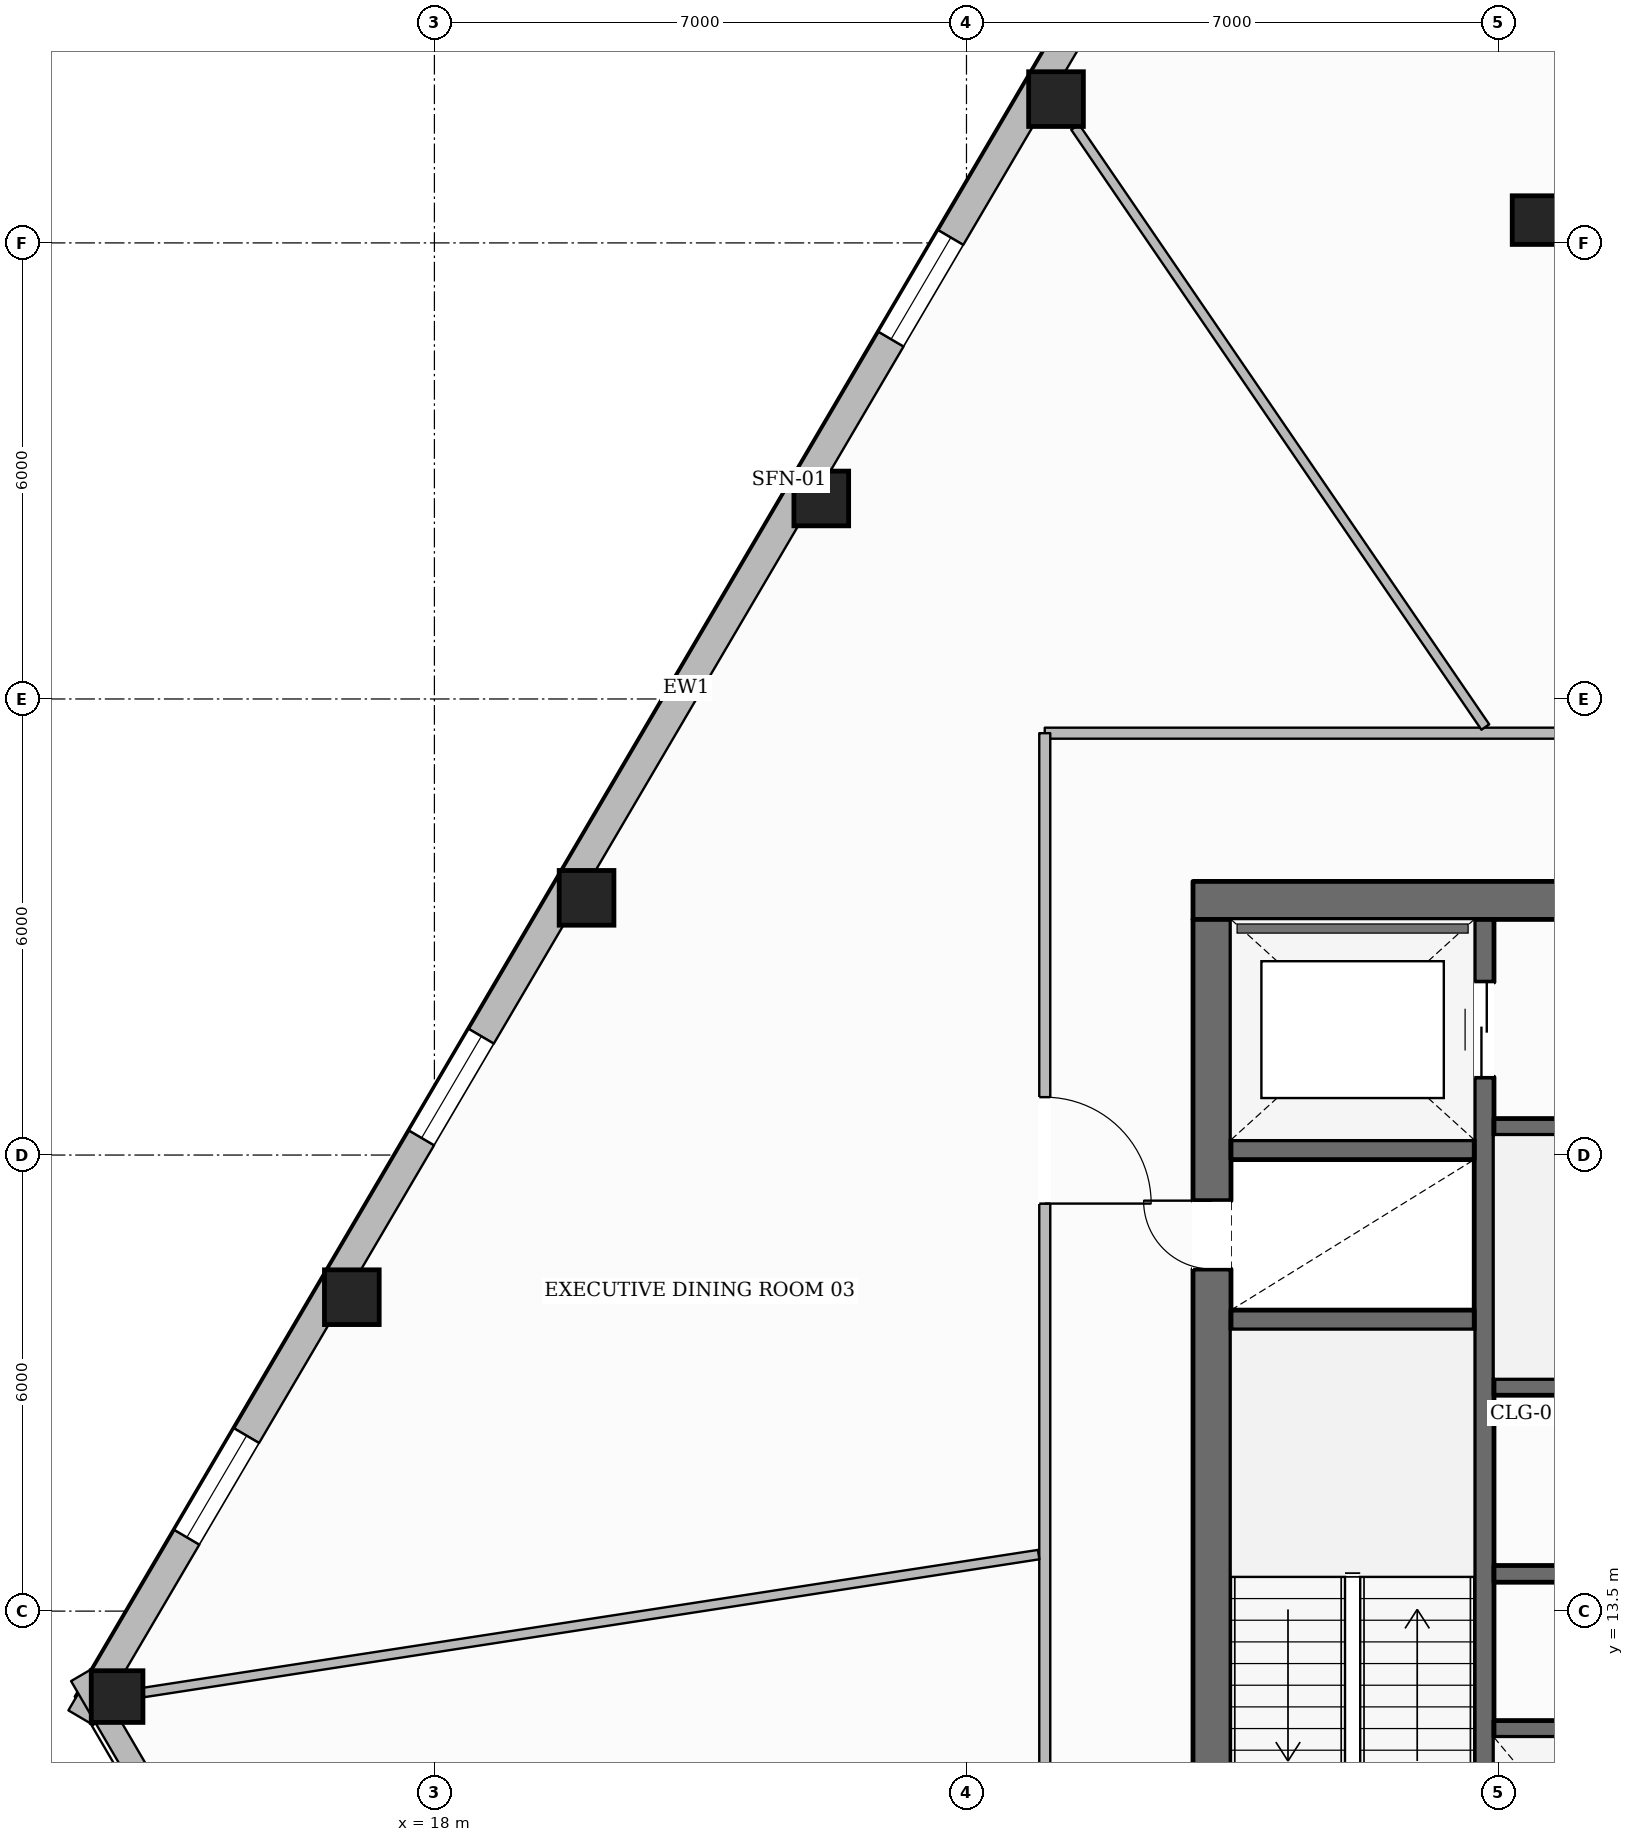
"""IFC4 building model, lengths in metres.
Left out: names, types, materials, properties, quantities, classifications, styles, units other than length and angle.
Written with IfcOpenShell. Run it as: python <this file> out.ifc"""

import sys

from ifc_helpers import new_model, si_unit, direction, frame, frame_2d, origin, origin_2d, place, context, subcontext, project, spatial, rectangle, hollow_rectangle, extrude, element, fill, save


model = new_model("IFC4")
c1 = context("Model", 3, precision=1e-05, world=origin(), true_north=direction((0.0, 1.0)))
c2 = subcontext(c1, "Body", "Model", "MODEL_VIEW")
j1 = project(units=[si_unit("LENGTHUNIT", "METRE"), si_unit("PLANEANGLEUNIT", "RADIAN")], contexts=[c1])
p1 = place(None, origin())
s1 = spatial("IfcSite", under=j1, at=p1, CompositionType="ELEMENT")
p2 = place(p1, origin())
s2 = spatial("IfcBuilding", under=s1, at=p2, CompositionType="ELEMENT")
p3 = place(p2, frame((0.0, 0.0, 135.55)))
s3 = spatial("IfcBuildingStorey", under=s2, at=p3, CompositionType="ELEMENT", Elevation=135.55)
p4 = place(p3, frame((27.98, 22.85, 0.0), z_axis=(0.0, 0.0, 1.0), x_axis=(1.0, 0.0, 0.0)))
e1 = element("IfcWall", 1, at=p4, inside=s3, PredefinedType="SOLIDWALL", context=c2, shape_type="SweptSolid", body=[
    extrude(rectangle(XDim=20.04, YDim=0.5, at=frame_2d((10.02, 0.0))), origin(), (0.0, 0.0, 1.0), 3.6),
])
p5 = place(p4, frame((6.295, 0.0, 0.0)))
e2 = element("IfcOpeningElement", 2, at=p5, cuts=e1, PredefinedType="OPENING", context=c2, shape_type="SweptSolid", body=[
    extrude(rectangle(XDim=1.05, YDim=2.15, at=frame_2d((0.525, 1.075))), frame((0.0, 0.26, 0.0), z_axis=(0.0, -1.0, 0.0), x_axis=(1.0, 0.0, 0.0)), (0.0, 0.0, 1.0), 0.52),
])
p6 = place(p4, frame((12.695, 0.0, 0.0)))
e3 = element("IfcOpeningElement", 3, at=p6, cuts=e1, PredefinedType="OPENING", context=c2, shape_type="SweptSolid", body=[
    extrude(rectangle(XDim=1.05, YDim=2.15, at=frame_2d((0.525, 1.075))), frame((0.0, 0.26, 0.0), z_axis=(0.0, -1.0, 0.0), x_axis=(1.0, 0.0, 0.0)), (0.0, 0.0, 1.0), 0.52),
])
p7 = place(p3, frame((28.23, 9.6, 0.0), z_axis=(0.0, 0.0, 1.0), x_axis=(0.0, 1.0, 0.0)))
e4 = element("IfcWall", 4, at=p7, inside=s3, PredefinedType="SOLIDWALL", context=c2, shape_type="SweptSolid", body=[
    extrude(rectangle(XDim=13.0, YDim=0.5, at=frame_2d((6.5, 0.0))), origin(), (0.0, 0.0, 1.0), 3.6),
])
p8 = place(p7, frame((0.2, 0.0, 0.0)))
e5 = element("IfcOpeningElement", 5, at=p8, cuts=e4, PredefinedType="OPENING", context=c2, shape_type="SweptSolid", body=[
    extrude(rectangle(XDim=1.1, YDim=2.15, at=frame_2d((0.55, 1.075))), frame((0.0, 0.26, 0.0), z_axis=(0.0, -1.0, 0.0), x_axis=(1.0, 0.0, 0.0)), (0.0, 0.0, 1.0), 0.52),
])
p9 = place(p7, frame((8.4, 0.0, 0.0)))
e6 = element("IfcOpeningElement", 6, at=p9, cuts=e4, PredefinedType="OPENING", context=c2, shape_type="SweptSolid", body=[
    extrude(rectangle(XDim=0.9, YDim=2.1, at=frame_2d((0.45, 1.05))), frame((0.0, 0.26, 0.0), z_axis=(0.0, -1.0, 0.0), x_axis=(1.0, 0.0, 0.0)), (0.0, 0.0, 1.0), 0.52),
])
p10 = place(p3, frame((31.81, 9.6, 0.0), z_axis=(0.0, 0.0, 1.0), x_axis=(0.0, 1.0, 0.0)))
e7 = element("IfcWall", 7, at=p10, inside=s3, PredefinedType="SHEAR", context=c2, shape_type="SweptSolid", body=[
    extrude(rectangle(XDim=13.0, YDim=0.26, at=frame_2d((6.5, 0.0))), origin(), (0.0, 0.0, 1.0), 3.6),
])
p11 = place(p10, frame((10.925, 0.0, 0.0)))
e8 = element("IfcOpeningElement", 8, at=p11, cuts=e7, PredefinedType="OPENING", context=c2, shape_type="SweptSolid", body=[
    extrude(rectangle(XDim=1.25, YDim=2.25, at=frame_2d((0.625, 1.125))), frame((0.0, 0.14, 0.0), z_axis=(0.0, -1.0, 0.0), x_axis=(1.0, 0.0, 0.0)), (0.0, 0.0, 1.0), 0.28),
])
for number, where, z_axis, x_axis in (
    (9, (28.48, 17.33, 0.0), (0.0, 0.0, 1.0), (1.0, 0.0, 0.0)),
    (10, (28.48, 19.57, 0.0), (0.0, 0.0, 1.0), (1.0, 0.0, 0.0)),
):
    element("IfcWall", number, at=place(p3, frame(where, z_axis=z_axis, x_axis=x_axis)), inside=s3, PredefinedType="SHEAR", context=c2, shape_type="SweptSolid", body=[
        extrude(rectangle(XDim=3.2, YDim=0.26, at=frame_2d((1.6, 0.0))), origin(), (0.0, 0.0, 1.0), 3.6),
    ])
p12 = place(p3, frame((31.94, 19.87, 0.0), z_axis=(0.0, 0.0, 1.0), x_axis=(1.0, 0.0, 0.0)))
e11 = element("IfcWall", 11, at=p12, inside=s3, PredefinedType="SOLIDWALL", context=c2, shape_type="SweptSolid", body=[
    extrude(rectangle(XDim=12.12, YDim=0.22, at=frame_2d((6.06, 0.0))), origin(), (0.0, 0.0, 1.0), 3.6),
])
p13 = place(p12, frame((6.3, 0.0, 0.0)))
e12 = element("IfcOpeningElement", 12, at=p13, cuts=e11, PredefinedType="OPENING", context=c2, shape_type="SweptSolid", body=[
    extrude(rectangle(XDim=1.1, YDim=2.15, at=frame_2d((0.55, 1.075))), frame((0.0, 0.12, 0.0), z_axis=(0.0, -1.0, 0.0), x_axis=(1.0, 0.0, 0.0)), (0.0, 0.0, 1.0), 0.24),
])
p14 = place(p12, frame((8.61, 0.0, 0.0)))
e13 = element("IfcOpeningElement", 13, at=p14, cuts=e11, PredefinedType="OPENING", context=c2, shape_type="SweptSolid", body=[
    extrude(rectangle(XDim=0.9, YDim=2.1, at=frame_2d((0.45, 1.05))), frame((0.0, 0.12, 0.0), z_axis=(0.0, -1.0, 0.0), x_axis=(1.0, 0.0, 0.0)), (0.0, 0.0, 1.0), 0.24),
])
p15 = place(p12, frame((10.85, 0.0, 0.0)))
e14 = element("IfcOpeningElement", 14, at=p15, cuts=e11, PredefinedType="OPENING", context=c2, shape_type="SweptSolid", body=[
    extrude(rectangle(XDim=0.9, YDim=2.1, at=frame_2d((0.45, 1.05))), frame((0.0, 0.12, 0.0), z_axis=(0.0, -1.0, 0.0), x_axis=(1.0, 0.0, 0.0)), (0.0, 0.0, 1.0), 0.24),
])
p16 = place(p3, frame((31.94, 16.45, 0.0), z_axis=(0.0, 0.0, 1.0), x_axis=(1.0, 0.0, 0.0)))
e15 = element("IfcWall", 15, at=p16, inside=s3, PredefinedType="SOLIDWALL", context=c2, shape_type="SweptSolid", body=[
    extrude(rectangle(XDim=12.12, YDim=0.22, at=frame_2d((6.06, 0.0))), origin(), (0.0, 0.0, 1.0), 3.6),
])
p17 = place(p3, frame((31.94, 13.99, 0.0), z_axis=(0.0, 0.0, 1.0), x_axis=(1.0, 0.0, 0.0)))
e16 = element("IfcWall", 16, at=p17, inside=s3, PredefinedType="SOLIDWALL", context=c2, shape_type="SweptSolid", body=[
    extrude(rectangle(XDim=12.12, YDim=0.22, at=frame_2d((6.06, 0.0))), origin(), (0.0, 0.0, 1.0), 3.6),
])
p18 = place(p17, frame((2.51, 0.0, 0.0)))
e17 = element("IfcOpeningElement", 17, at=p18, cuts=e16, PredefinedType="OPENING", context=c2, shape_type="SweptSolid", body=[
    extrude(rectangle(XDim=0.9, YDim=2.1, at=frame_2d((0.45, 1.05))), frame((0.0, 0.12, 0.0), z_axis=(0.0, -1.0, 0.0), x_axis=(1.0, 0.0, 0.0)), (0.0, 0.0, 1.0), 0.24),
])
p19 = place(p17, frame((6.535, 0.0, 0.0)))
e18 = element("IfcOpeningElement", 18, at=p19, cuts=e16, PredefinedType="OPENING", context=c2, shape_type="SweptSolid", body=[
    extrude(rectangle(XDim=1.1, YDim=2.2, at=frame_2d((0.55, 1.1))), frame((0.0, 0.12, 0.0), z_axis=(0.0, -1.0, 0.0), x_axis=(1.0, 0.0, 0.0)), (0.0, 0.0, 1.0), 0.24),
])
p20 = place(p17, frame((8.585, 0.0, 0.0)))
e19 = element("IfcOpeningElement", 19, at=p20, cuts=e16, PredefinedType="OPENING", context=c2, shape_type="SweptSolid", body=[
    extrude(rectangle(XDim=1.1, YDim=2.2, at=frame_2d((0.55, 1.1))), frame((0.0, 0.12, 0.0), z_axis=(0.0, -1.0, 0.0), x_axis=(1.0, 0.0, 0.0)), (0.0, 0.0, 1.0), 0.24),
])
p21 = place(p17, frame((10.635, 0.0, 0.0)))
e20 = element("IfcOpeningElement", 20, at=p21, cuts=e16, PredefinedType="OPENING", context=c2, shape_type="SweptSolid", body=[
    extrude(rectangle(XDim=1.1, YDim=2.2, at=frame_2d((0.55, 1.1))), frame((0.0, 0.12, 0.0), z_axis=(0.0, -1.0, 0.0), x_axis=(1.0, 0.0, 0.0)), (0.0, 0.0, 1.0), 0.24),
])
p22 = place(p3, frame((31.94, 11.95, 0.0), z_axis=(0.0, 0.0, 1.0), x_axis=(1.0, 0.0, 0.0)))
e21 = element("IfcWall", 21, at=p22, inside=s3, PredefinedType="SOLIDWALL", context=c2, shape_type="SweptSolid", body=[
    extrude(rectangle(XDim=6.19, YDim=0.22, at=frame_2d((3.095, 0.0))), origin(), (0.0, 0.0, 1.0), 3.6),
])
for number, where, z_axis, x_axis in (
    (22, (26.178, 33.392, 0.0), (0.0, 0.0, 1.0), (1.0, 0.0, 0.0)),
    (23, (23.09, 28.138, 0.0), (0.0, 0.0, 1.0), (1.0, 0.0, 0.0)),
    (24, (20.002, 22.884, 0.0), (0.0, 0.0, 1.0), (1.0, 0.0, 0.0)),
    (25, (16.914, 17.63, 0.0), (0.0, 0.0, 1.0), (1.0, 0.0, 0.0)),
):
    element("IfcColumn", number, at=place(p3, frame(where, z_axis=z_axis, x_axis=x_axis)), inside=s3, PredefinedType="COLUMN", context=c2, shape_type="SweptSolid", body=[
        extrude(hollow_rectangle(XDim=0.72, YDim=0.72, WallThickness=0.032, at=origin_2d()), origin(), (0.0, 0.0, 1.0), 3.6),
    ])
p23 = place(p3, frame((13.825, 12.376, 0.0), z_axis=(0.0, 0.0, 1.0), x_axis=(1.0, 0.0, 0.0)))
e26 = element("IfcColumn", 26, at=p23, inside=s3, PredefinedType="COLUMN", context=c2, shape_type="SweptSolid", body=[
    extrude(hollow_rectangle(XDim=0.68, YDim=0.68, WallThickness=0.03, at=origin_2d()), origin(), (0.0, 0.0, 1.0), 3.6),
])
p24 = place(p3, frame((32.5, 31.8, 0.0), z_axis=(0.0, 0.0, 1.0), x_axis=(1.0, 0.0, 0.0)))
e27 = element("IfcColumn", 27, at=p24, inside=s3, PredefinedType="COLUMN", context=c2, shape_type="SweptSolid", body=[
    extrude(hollow_rectangle(XDim=0.64, YDim=0.64, WallThickness=0.028, at=origin_2d()), origin(), (0.0, 0.0, 1.0), 3.6),
])
p25 = place(p3, frame((13.349, 12.098, 0.0), z_axis=(0.0, 0.0, 1.0), x_axis=(0.506726076083, 0.862107118528, 0.0)))
e28 = element("IfcWall", 28, at=p25, inside=s3, PredefinedType="STANDARD", context=c2, shape_type="SweptSolid", body=[
    extrude(rectangle(XDim=37.522, YDim=0.38, at=frame_2d((18.761, 0.0))), origin(), (0.0, 0.0, 1.0), 3.059),
])
p26 = place(p25, frame((33.226, 0.0, 0.65)))
e29 = element("IfcOpeningElement", 29, at=p26, cuts=e28, PredefinedType="OPENING", context=c2, shape_type="SweptSolid", body=[
    extrude(rectangle(XDim=1.55, YDim=1.75, at=frame_2d((0.775, 0.875))), frame((0.0, 0.2, 0.0), z_axis=(0.0, -1.0, 0.0), x_axis=(1.0, 0.0, 0.0)), (0.0, 0.0, 1.0), 0.4),
])
p27 = place(p25, frame((27.131, 0.0, 0.65)))
e30 = element("IfcOpeningElement", 30, at=p27, cuts=e28, PredefinedType="OPENING", context=c2, shape_type="SweptSolid", body=[
    extrude(rectangle(XDim=1.55, YDim=1.75, at=frame_2d((0.775, 0.875))), frame((0.0, 0.2, 0.0), z_axis=(0.0, -1.0, 0.0), x_axis=(1.0, 0.0, 0.0)), (0.0, 0.0, 1.0), 0.4),
])
p28 = place(p25, frame((21.037, 0.0, 0.65)))
e31 = element("IfcOpeningElement", 31, at=p28, cuts=e28, PredefinedType="OPENING", context=c2, shape_type="SweptSolid", body=[
    extrude(rectangle(XDim=1.55, YDim=1.75, at=frame_2d((0.775, 0.875))), frame((0.0, 0.2, 0.0), z_axis=(0.0, -1.0, 0.0), x_axis=(1.0, 0.0, 0.0)), (0.0, 0.0, 1.0), 0.4),
])
p29 = place(p25, frame((8.848, 0.0, 0.65)))
e32 = element("IfcOpeningElement", 32, at=p29, cuts=e28, PredefinedType="OPENING", context=c2, shape_type="SweptSolid", body=[
    extrude(rectangle(XDim=1.55, YDim=1.75, at=frame_2d((0.775, 0.875))), frame((0.0, 0.2, 0.0), z_axis=(0.0, -1.0, 0.0), x_axis=(1.0, 0.0, 0.0)), (0.0, 0.0, 1.0), 0.4),
])
p30 = place(p25, frame((2.753, 0.0, 0.65)))
e33 = element("IfcOpeningElement", 33, at=p30, cuts=e28, PredefinedType="OPENING", context=c2, shape_type="SweptSolid", body=[
    extrude(rectangle(XDim=1.55, YDim=1.75, at=frame_2d((0.775, 0.875))), frame((0.0, 0.2, 0.0), z_axis=(0.0, -1.0, 0.0), x_axis=(1.0, 0.0, 0.0)), (0.0, 0.0, 1.0), 0.4),
])
p31 = place(p3, frame((19.411, 2.271, 0.0), z_axis=(0.0, 0.0, 1.0), x_axis=(-0.504147492574, 0.863617569142, 0.0)))
e34 = element("IfcWall", 34, at=p31, inside=s3, PredefinedType="STANDARD", context=c2, shape_type="SweptSolid", body=[
    extrude(rectangle(XDim=12.023, YDim=0.3, at=frame_2d((6.012, 0.0))), origin(), (0.0, 0.0, 1.0), 3.059),
])
p32 = place(p31, frame((5.412, 0.0, 0.65)))
e35 = element("IfcOpeningElement", 35, at=p32, cuts=e34, PredefinedType="OPENING", context=c2, shape_type="SweptSolid", body=[
    extrude(rectangle(XDim=1.2, YDim=1.7, at=frame_2d((0.6, 0.85))), frame((0.0, 0.16, 0.0), z_axis=(0.0, -1.0, 0.0), x_axis=(1.0, 0.0, 0.0)), (0.0, 0.0, 1.0), 0.32),
])
p33 = place(p3, frame((49.97, 25.05, 0.0), z_axis=(0.0, 0.0, 1.0), x_axis=(-1.0, 0.0, 0.0)))
e36 = element("IfcWall", 36, at=p33, inside=s3, PredefinedType="PARTITIONING", context=c2, shape_type="SweptSolid", body=[
    extrude(rectangle(XDim=23.94, YDim=0.145, at=frame_2d((11.97, 0.0))), origin(), (0.0, 0.0, 1.0), 3.6),
])
p34 = place(p33, frame((14.53, 0.0, 0.0)))
e37 = element("IfcOpeningElement", 37, at=p34, cuts=e36, PredefinedType="OPENING", context=c2, shape_type="SweptSolid", body=[
    extrude(rectangle(XDim=0.88, YDim=2.1, at=frame_2d((0.44, 1.05))), frame((0.0, 0.083, 0.0), z_axis=(0.0, -1.0, 0.0), x_axis=(1.0, 0.0, 0.0)), (0.0, 0.0, 1.0), 0.165),
])
p35 = place(p33, frame((12.01, 0.0, 0.0)))
e38 = element("IfcOpeningElement", 38, at=p35, cuts=e36, PredefinedType="OPENING", context=c2, shape_type="SweptSolid", body=[
    extrude(rectangle(XDim=0.88, YDim=2.1, at=frame_2d((0.44, 1.05))), frame((0.0, 0.083, 0.0), z_axis=(0.0, -1.0, 0.0), x_axis=(1.0, 0.0, 0.0)), (0.0, 0.0, 1.0), 0.165),
])
p36 = place(p33, frame((9.55, 0.0, 0.0)))
e39 = element("IfcOpeningElement", 39, at=p36, cuts=e36, PredefinedType="OPENING", context=c2, shape_type="SweptSolid", body=[
    extrude(rectangle(XDim=0.96, YDim=2.1, at=frame_2d((0.48, 1.05))), frame((0.0, 0.083, 0.0), z_axis=(0.0, -1.0, 0.0), x_axis=(1.0, 0.0, 0.0)), (0.0, 0.0, 1.0), 0.165),
])
p37 = place(p33, frame((6.709, 0.0, 0.0)))
e40 = element("IfcOpeningElement", 40, at=p37, cuts=e36, PredefinedType="OPENING", context=c2, shape_type="SweptSolid", body=[
    extrude(rectangle(XDim=1.4, YDim=2.2, at=frame_2d((0.7, 1.1))), frame((0.0, 0.083, 0.0), z_axis=(0.0, -1.0, 0.0), x_axis=(1.0, 0.0, 0.0)), (0.0, 0.0, 1.0), 0.165),
])
p38 = place(p3, frame((26.03, 25.05, 0.0), z_axis=(0.0, 0.0, 1.0), x_axis=(0.0, -1.0, 0.0)))
e41 = element("IfcWall", 41, at=p38, inside=s3, PredefinedType="PARTITIONING", context=c2, shape_type="SweptSolid", body=[
    extrude(rectangle(XDim=17.9, YDim=0.145, at=frame_2d((8.95, 0.0))), origin(), (0.0, 0.0, 1.0), 3.288),
])
p39 = place(p38, frame((4.789, 0.0, 0.0)))
e42 = element("IfcOpeningElement", 42, at=p39, cuts=e41, PredefinedType="OPENING", context=c2, shape_type="SweptSolid", body=[
    extrude(rectangle(XDim=1.4, YDim=2.2, at=frame_2d((0.7, 1.1))), frame((0.0, 0.083, 0.0), z_axis=(0.0, -1.0, 0.0), x_axis=(1.0, 0.0, 0.0)), (0.0, 0.0, 1.0), 0.165),
])
p40 = place(p3, frame((31.826, 25.131, 0.0), z_axis=(0.0, 0.0, 1.0), x_axis=(-0.564384562589, 0.825512002039, 0.0)))
e43 = element("IfcWall", 43, at=p40, inside=s3, PredefinedType="PARTITIONING", context=c2, shape_type="SweptSolid", body=[
    extrude(rectangle(XDim=9.562, YDim=0.125, at=frame_2d((4.781, 0.0))), origin(), (0.0, 0.0, 1.0), 3.6),
])
p41 = place(p3, frame((25.949, 14.243, 0.0), z_axis=(0.0, 0.0, 1.0), x_axis=(-0.98834017142, -0.152261963591, 0.0)))
e44 = element("IfcWall", 44, at=p41, inside=s3, PredefinedType="PARTITIONING", context=c2, shape_type="SweptSolid", body=[
    extrude(rectangle(XDim=11.915, YDim=0.125, at=frame_2d((5.958, 0.0))), origin(), (0.0, 0.0, 1.0), 3.141),
])
p42 = place(p28, origin())
e45 = element("IfcWindow", 45, at=p42, inside=s3, PartitioningType="SINGLE_PANEL", PredefinedType="WINDOW", context=c2, shape_type="SweptSolid", body=[
    extrude(rectangle(XDim=1.55, YDim=1.75, at=frame_2d((0.775, 0.875))), frame((0.0, 0.03, 0.0), z_axis=(0.0, -1.0, 0.0), x_axis=(1.0, 0.0, 0.0)), (0.0, 0.0, 1.0), 0.06),
])
fill(e31, e45)
p43 = place(p29, origin())
e46 = element("IfcWindow", 46, at=p43, inside=s3, PartitioningType="SINGLE_PANEL", PredefinedType="WINDOW", context=c2, shape_type="SweptSolid", body=[
    extrude(rectangle(XDim=1.55, YDim=1.75, at=frame_2d((0.775, 0.875))), frame((0.0, 0.03, 0.0), z_axis=(0.0, -1.0, 0.0), x_axis=(1.0, 0.0, 0.0)), (0.0, 0.0, 1.0), 0.06),
])
fill(e32, e46)
p44 = place(p30, origin())
e47 = element("IfcWindow", 47, at=p44, inside=s3, PartitioningType="SINGLE_PANEL", PredefinedType="WINDOW", context=c2, shape_type="SweptSolid", body=[
    extrude(rectangle(XDim=1.55, YDim=1.75, at=frame_2d((0.775, 0.875))), frame((0.0, 0.03, 0.0), z_axis=(0.0, -1.0, 0.0), x_axis=(1.0, 0.0, 0.0)), (0.0, 0.0, 1.0), 0.06),
])
fill(e33, e47)
p45 = place(p9, origin())
e48 = element("IfcDoor", 48, at=p45, inside=s3, OperationType="SINGLE_SWING_RIGHT", PredefinedType="DOOR", context=c2, shape_type="SweptSolid", body=[
    extrude(rectangle(XDim=0.9, YDim=2.1, at=frame_2d((0.45, 1.05))), frame((0.0, 0.025, 0.0), z_axis=(0.0, -1.0, 0.0), x_axis=(1.0, 0.0, 0.0)), (0.0, 0.0, 1.0), 0.05),
])
fill(e6, e48)
p46 = place(p11, origin())
e49 = element("IfcDoor", 49, at=p46, inside=s3, OperationType="DOUBLE_DOOR_SLIDING", PredefinedType="DOOR", context=c2, shape_type="SweptSolid", body=[
    extrude(rectangle(XDim=1.25, YDim=2.25, at=frame_2d((0.625, 1.125))), frame((0.0, 0.025, 0.0), z_axis=(0.0, -1.0, 0.0), x_axis=(1.0, 0.0, 0.0)), (0.0, 0.0, 1.0), 0.05),
])
fill(e8, e49)
p47 = place(p39, origin())
e50 = element("IfcDoor", 50, at=p47, inside=s3, OperationType="SINGLE_SWING_RIGHT", PredefinedType="DOOR", context=c2, shape_type="SweptSolid", body=[
    extrude(rectangle(XDim=1.4, YDim=2.2, at=frame_2d((0.7, 1.1))), frame((0.0, 0.025, 0.0), z_axis=(0.0, -1.0, 0.0), x_axis=(1.0, 0.0, 0.0)), (0.0, 0.0, 1.0), 0.05),
])
fill(e42, e50)
save(model, sys.argv[1])
